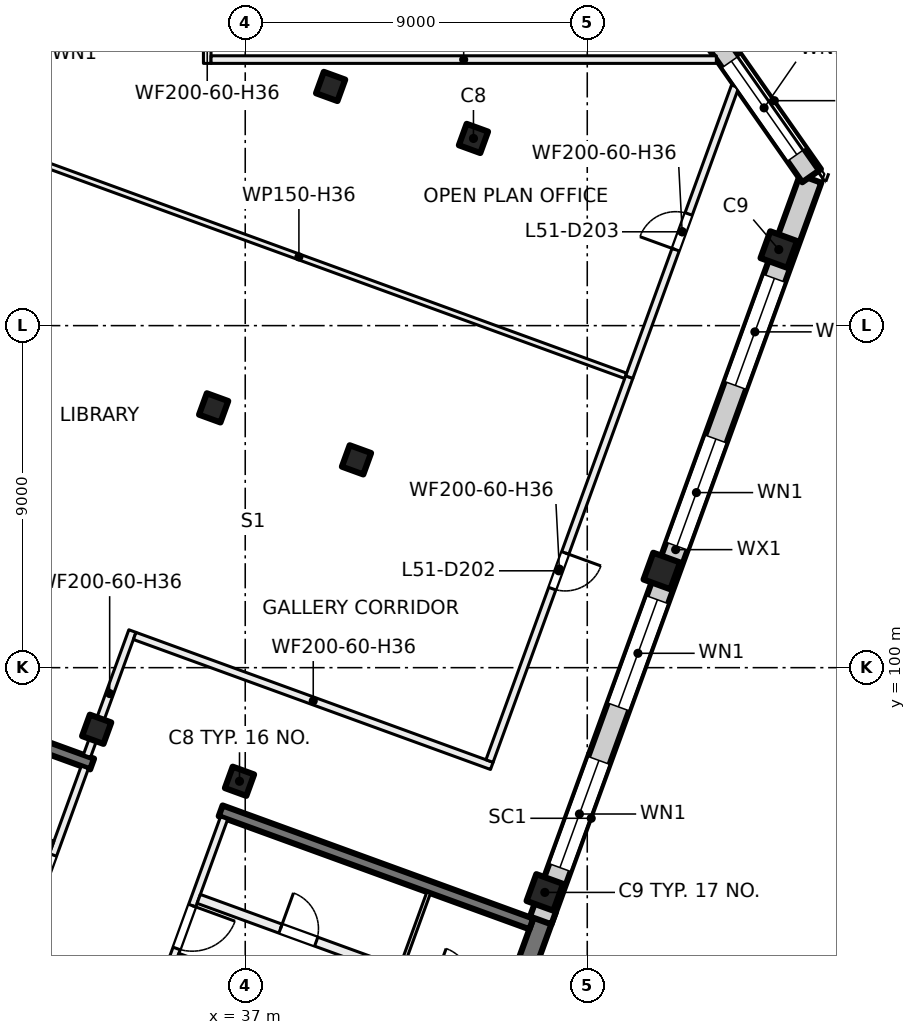
"""IFC4 building model, lengths in metres.
Left out: names, types, materials, properties, quantities, classifications, styles, units other than length and angle.
Written with IfcOpenShell. Run it as: python <this file> out.ifc"""

import sys

from ifc_helpers import new_model, si_unit, direction, frame, frame_2d, origin, origin_2d, place, context, subcontext, project, spatial, rectangle, extrude, element, fill, save


model = new_model("IFC4")
c1 = context("Model", 3, precision=1e-05, world=origin(), true_north=direction((0.0, 1.0)))
c2 = subcontext(c1, "Body", "Model", "MODEL_VIEW")
j1 = project(units=[si_unit("LENGTHUNIT", "METRE"), si_unit("PLANEANGLEUNIT", "RADIAN")], contexts=[c1])
p1 = place(None, origin())
s1 = spatial("IfcSite", under=j1, at=p1, CompositionType="ELEMENT")
p2 = place(p1, origin())
s2 = spatial("IfcBuilding", under=s1, at=p2, CompositionType="ELEMENT")
p3 = place(p2, frame((0.0, 0.0, 216.0)))
s3 = spatial("IfcBuildingStorey", under=s2, at=p3, CompositionType="ELEMENT", Elevation=216.0)
for number, where, z_axis, x_axis in (
    (1, (43.006, 113.925, 0.0), (0.0, 0.0, 1.0), (-0.342, -0.94, 0.0)),
    (2, (39.927, 105.468, 0.0), (0.0, 0.0, 1.0), (-0.342, -0.94, 0.0)),
    (3, (36.849, 97.011, 0.0), (0.0, 0.0, 1.0), (-0.342, -0.94, 0.0)),
    (4, (39.247, 115.293, 0.0), (0.0, 0.0, 1.0), (-0.342, -0.94, 0.0)),
    (5, (36.169, 106.836, 0.0), (0.0, 0.0, 1.0), (-0.342, -0.94, 0.0)),
    (6, (33.091, 98.379, 0.0), (0.0, 0.0, 1.0), (-0.342, -0.94, 0.0)),
):
    element("IfcColumn", number, at=place(p3, frame(where, z_axis=z_axis, x_axis=x_axis)), inside=s3, PredefinedType="COLUMN", context=c2, shape_type="SweptSolid", body=[
        extrude(rectangle(XDim=0.6, YDim=0.6, at=origin_2d()), origin(), (0.0, 0.0, 1.0), 4.0),
    ])
for number, where, z_axis, x_axis in (
    (7, (51.04, 111.001, 0.0), (0.0, 0.0, 1.0), (-0.342, -0.94, 0.0)),
    (8, (47.962, 102.544, 0.0), (0.0, 0.0, 1.0), (-0.342, -0.94, 0.0)),
    (9, (44.884, 94.087, 0.0), (0.0, 0.0, 1.0), (-0.342, -0.94, 0.0)),
):
    element("IfcColumn", number, at=place(p3, frame(where, z_axis=z_axis, x_axis=x_axis)), inside=s3, PredefinedType="COLUMN", context=c2, shape_type="SweptSolid", body=[
        extrude(rectangle(XDim=0.75, YDim=0.75, at=origin_2d()), origin(), (0.0, 0.0, 1.0), 4.0),
    ])
p4 = place(p3, frame((41.874, 85.232, 0.0), z_axis=(0.0, 0.0, 1.0), x_axis=(0.342020437038, 0.939692513883, 0.0)))
e10 = element("IfcWall", 10, at=p4, inside=s3, PredefinedType="SHEAR", context=c2, shape_type="SweptSolid", body=[
    extrude(rectangle(XDim=8.975, YDim=0.5, at=frame_2d((4.487, 0.0))), origin(), (0.0, 0.0, 1.0), 4.0),
])
p5 = place(p3, frame((44.529, 93.258, 0.0), z_axis=(0.0, 0.0, 1.0), x_axis=(-0.9396917844, 0.342022441267, 0.0)))
e11 = element("IfcWall", 11, at=p5, inside=s3, PredefinedType="SHEAR", context=c2, shape_type="SweptSolid", body=[
    extrude(rectangle(XDim=8.7, YDim=0.3, at=frame_2d((4.35, 0.0))), origin(), (0.0, 0.0, 1.0), 4.0),
])
p6 = place(p3, frame((32.971, 97.465, 0.0), z_axis=(0.0, 0.0, 1.0), x_axis=(-0.939695066972, 0.34201342241, 0.0)))
e12 = element("IfcWall", 12, at=p6, inside=s3, PredefinedType="SHEAR", context=c2, shape_type="SweptSolid", body=[
    extrude(rectangle(XDim=8.7, YDim=0.3, at=frame_2d((4.35, 0.0))), origin(), (0.0, 0.0, 1.0), 4.0),
])
p7 = place(p3, frame((51.877, 112.862, 0.0), z_axis=(0.0, 0.0, 1.0), x_axis=(-0.342020589714, -0.939692458314, 0.0)))
e13 = element("IfcWall", 13, at=p7, inside=s3, PredefinedType="SOLIDWALL", context=c2, shape_type="SweptSolid", body=[
    extrude(rectangle(XDim=20.765, YDim=0.6, at=frame_2d((10.382, 0.0))), origin(), (0.0, 0.0, 1.0), 3.625),
])
p8 = place(p7, frame((2.785, 0.0, 0.9)))
e14 = element("IfcOpeningElement", 14, at=p8, cuts=e13, PredefinedType="OPENING", context=c2, shape_type="SweptSolid", body=[
    extrude(rectangle(XDim=3.0, YDim=2.4, at=frame_2d((1.5, 1.2))), frame((0.0, 0.31, 0.0), z_axis=(0.0, -1.0, 0.0), x_axis=(1.0, 0.0, 0.0)), (0.0, 0.0, 1.0), 0.62),
])
p9 = place(p7, frame((7.285, 0.0, 0.9)))
e15 = element("IfcOpeningElement", 15, at=p9, cuts=e13, PredefinedType="OPENING", context=c2, shape_type="SweptSolid", body=[
    extrude(rectangle(XDim=3.0, YDim=2.4, at=frame_2d((1.5, 1.2))), frame((0.0, 0.31, 0.0), z_axis=(0.0, -1.0, 0.0), x_axis=(1.0, 0.0, 0.0)), (0.0, 0.0, 1.0), 0.62),
])
p10 = place(p7, frame((11.785, 0.0, 0.9)))
e16 = element("IfcOpeningElement", 16, at=p10, cuts=e13, PredefinedType="OPENING", context=c2, shape_type="SweptSolid", body=[
    extrude(rectangle(XDim=3.0, YDim=2.4, at=frame_2d((1.5, 1.2))), frame((0.0, 0.31, 0.0), z_axis=(0.0, -1.0, 0.0), x_axis=(1.0, 0.0, 0.0)), (0.0, 0.0, 1.0), 0.62),
])
p11 = place(p7, frame((16.285, 0.0, 0.9)))
e17 = element("IfcOpeningElement", 17, at=p11, cuts=e13, PredefinedType="OPENING", context=c2, shape_type="SweptSolid", body=[
    extrude(rectangle(XDim=3.0, YDim=2.4, at=frame_2d((1.5, 1.2))), frame((0.0, 0.31, 0.0), z_axis=(0.0, -1.0, 0.0), x_axis=(1.0, 0.0, 0.0)), (0.0, 0.0, 1.0), 0.62),
])
p12 = place(p3, frame((36.923, 134.338, 0.0), z_axis=(0.0, 0.0, 1.0), x_axis=(0.573575266068, -0.819152863729, 0.0)))
e18 = element("IfcWall", 18, at=p12, inside=s3, PredefinedType="SOLIDWALL", context=c2, shape_type="SweptSolid", body=[
    extrude(rectangle(XDim=26.117, YDim=0.6, at=frame_2d((13.059, 0.0))), origin(), (0.0, 0.0, 1.0), 3.625),
])
p13 = place(p12, frame((0.84, 0.0, 0.9)))
e19 = element("IfcOpeningElement", 19, at=p13, cuts=e18, PredefinedType="OPENING", context=c2, shape_type="SweptSolid", body=[
    extrude(rectangle(XDim=3.0, YDim=2.4, at=frame_2d((1.5, 1.2))), frame((0.0, 0.31, 0.0), z_axis=(0.0, -1.0, 0.0), x_axis=(1.0, 0.0, 0.0)), (0.0, 0.0, 1.0), 0.62),
])
p14 = place(p12, frame((5.069, 0.0, 0.9)))
e20 = element("IfcOpeningElement", 20, at=p14, cuts=e18, PredefinedType="OPENING", context=c2, shape_type="SweptSolid", body=[
    extrude(rectangle(XDim=3.0, YDim=2.4, at=frame_2d((1.5, 1.2))), frame((0.0, 0.31, 0.0), z_axis=(0.0, -1.0, 0.0), x_axis=(1.0, 0.0, 0.0)), (0.0, 0.0, 1.0), 0.62),
])
p15 = place(p12, frame((9.449, 0.0, 0.9)))
e21 = element("IfcOpeningElement", 21, at=p15, cuts=e18, PredefinedType="OPENING", context=c2, shape_type="SweptSolid", body=[
    extrude(rectangle(XDim=3.0, YDim=2.4, at=frame_2d((1.5, 1.2))), frame((0.0, 0.31, 0.0), z_axis=(0.0, -1.0, 0.0), x_axis=(1.0, 0.0, 0.0)), (0.0, 0.0, 1.0), 0.62),
])
p16 = place(p12, frame((13.829, 0.0, 0.9)))
e22 = element("IfcOpeningElement", 22, at=p16, cuts=e18, PredefinedType="OPENING", context=c2, shape_type="SweptSolid", body=[
    extrude(rectangle(XDim=3.0, YDim=2.4, at=frame_2d((1.5, 1.2))), frame((0.0, 0.31, 0.0), z_axis=(0.0, -1.0, 0.0), x_axis=(1.0, 0.0, 0.0)), (0.0, 0.0, 1.0), 0.62),
])
p17 = place(p12, frame((18.208, 0.0, 0.9)))
e23 = element("IfcOpeningElement", 23, at=p17, cuts=e18, PredefinedType="OPENING", context=c2, shape_type="SweptSolid", body=[
    extrude(rectangle(XDim=3.0, YDim=2.4, at=frame_2d((1.5, 1.2))), frame((0.0, 0.31, 0.0), z_axis=(0.0, -1.0, 0.0), x_axis=(1.0, 0.0, 0.0)), (0.0, 0.0, 1.0), 0.62),
])
p18 = place(p12, frame((22.438, 0.0, 0.9)))
e24 = element("IfcOpeningElement", 24, at=p18, cuts=e18, PredefinedType="OPENING", context=c2, shape_type="SweptSolid", body=[
    extrude(rectangle(XDim=3.0, YDim=2.4, at=frame_2d((1.5, 1.2))), frame((0.0, 0.31, 0.0), z_axis=(0.0, -1.0, 0.0), x_axis=(1.0, 0.0, 0.0)), (0.0, 0.0, 1.0), 0.62),
])
p19 = place(p3, frame((24.666, 100.669, 0.0), z_axis=(0.0, 0.0, 1.0), x_axis=(0.34201964167, 0.939692803373, 0.0)))
e25 = element("IfcWall", 25, at=p19, inside=s3, PredefinedType="SOLIDWALL", context=c2, shape_type="SweptSolid", body=[
    extrude(rectangle(XDim=32.884, YDim=0.6, at=frame_2d((16.442, 0.0))), origin(), (0.0, 0.0, 1.0), 3.625),
])
p20 = place(p19, frame((1.48, 0.0, 0.9)))
e26 = element("IfcOpeningElement", 26, at=p20, cuts=e25, PredefinedType="OPENING", context=c2, shape_type="SweptSolid", body=[
    extrude(rectangle(XDim=3.0, YDim=2.4, at=frame_2d((1.5, 1.2))), frame((0.0, 0.31, 0.0), z_axis=(0.0, -1.0, 0.0), x_axis=(1.0, 0.0, 0.0)), (0.0, 0.0, 1.0), 0.62),
])
p21 = place(p19, frame((5.98, 0.0, 0.9)))
e27 = element("IfcOpeningElement", 27, at=p21, cuts=e25, PredefinedType="OPENING", context=c2, shape_type="SweptSolid", body=[
    extrude(rectangle(XDim=3.0, YDim=2.4, at=frame_2d((1.5, 1.2))), frame((0.0, 0.31, 0.0), z_axis=(0.0, -1.0, 0.0), x_axis=(1.0, 0.0, 0.0)), (0.0, 0.0, 1.0), 0.62),
])
p22 = place(p19, frame((10.48, 0.0, 0.9)))
e28 = element("IfcOpeningElement", 28, at=p22, cuts=e25, PredefinedType="OPENING", context=c2, shape_type="SweptSolid", body=[
    extrude(rectangle(XDim=3.0, YDim=2.4, at=frame_2d((1.5, 1.2))), frame((0.0, 0.31, 0.0), z_axis=(0.0, -1.0, 0.0), x_axis=(1.0, 0.0, 0.0)), (0.0, 0.0, 1.0), 0.62),
])
p23 = place(p19, frame((14.98, 0.0, 0.9)))
e29 = element("IfcOpeningElement", 29, at=p23, cuts=e25, PredefinedType="OPENING", context=c2, shape_type="SweptSolid", body=[
    extrude(rectangle(XDim=3.0, YDim=2.4, at=frame_2d((1.5, 1.2))), frame((0.0, 0.31, 0.0), z_axis=(0.0, -1.0, 0.0), x_axis=(1.0, 0.0, 0.0)), (0.0, 0.0, 1.0), 0.62),
])
p24 = place(p19, frame((19.48, 0.0, 0.9)))
e30 = element("IfcOpeningElement", 30, at=p24, cuts=e25, PredefinedType="OPENING", context=c2, shape_type="SweptSolid", body=[
    extrude(rectangle(XDim=3.0, YDim=2.4, at=frame_2d((1.5, 1.2))), frame((0.0, 0.31, 0.0), z_axis=(0.0, -1.0, 0.0), x_axis=(1.0, 0.0, 0.0)), (0.0, 0.0, 1.0), 0.62),
])
p25 = place(p19, frame((23.98, 0.0, 0.9)))
e31 = element("IfcOpeningElement", 31, at=p25, cuts=e25, PredefinedType="OPENING", context=c2, shape_type="SweptSolid", body=[
    extrude(rectangle(XDim=3.0, YDim=2.4, at=frame_2d((1.5, 1.2))), frame((0.0, 0.31, 0.0), z_axis=(0.0, -1.0, 0.0), x_axis=(1.0, 0.0, 0.0)), (0.0, 0.0, 1.0), 0.62),
])
p26 = place(p19, frame((28.48, 0.0, 0.9)))
e32 = element("IfcOpeningElement", 32, at=p26, cuts=e25, PredefinedType="OPENING", context=c2, shape_type="SweptSolid", body=[
    extrude(rectangle(XDim=3.0, YDim=2.4, at=frame_2d((1.5, 1.2))), frame((0.0, 0.31, 0.0), z_axis=(0.0, -1.0, 0.0), x_axis=(1.0, 0.0, 0.0)), (0.0, 0.0, 1.0), 0.62),
])
p27 = place(p3, frame((31.427, 93.663, 0.0), z_axis=(0.0, 0.0, 1.0), x_axis=(0.342030870568, 0.93968871632, 0.0)))
e33 = element("IfcWall", 33, at=p27, inside=s3, PredefinedType="PARTITIONING", context=c2, shape_type="SweptSolid", body=[
    extrude(rectangle(XDim=3.95, YDim=0.2, at=frame_2d((1.975, 0.0))), origin(), (0.0, 0.0, 1.0), 3.625),
])
p28 = place(p27, frame((0.3, 0.0, 0.0)))
e34 = element("IfcOpeningElement", 34, at=p28, cuts=e33, PredefinedType="OPENING", context=c2, shape_type="SweptSolid", body=[
    extrude(rectangle(XDim=1.2, YDim=2.1, at=frame_2d((0.6, 1.05))), frame((0.0, 0.11, 0.0), z_axis=(0.0, -1.0, 0.0), x_axis=(1.0, 0.0, 0.0)), (0.0, 0.0, 1.0), 0.22),
])
p29 = place(p3, frame((23.983, 98.208, 0.0), z_axis=(0.0, 0.0, 1.0), x_axis=(0.939699751196, -0.342000552051, 0.0)))
e35 = element("IfcWall", 35, at=p29, inside=s3, PredefinedType="PARTITIONING", context=c2, shape_type="SweptSolid", body=[
    extrude(rectangle(XDim=8.45, YDim=0.25, at=frame_2d((4.225, 0.0))), origin(), (0.0, 0.0, 1.0), 3.625),
])
p30 = place(p29, frame((5.96, 0.0, 0.0)))
e36 = element("IfcOpeningElement", 36, at=p30, cuts=e35, PredefinedType="OPENING", context=c2, shape_type="SweptSolid", body=[
    extrude(rectangle(XDim=0.8, YDim=2.1, at=frame_2d((0.4, 1.05))), frame((0.0, 0.135, 0.0), z_axis=(0.0, -1.0, 0.0), x_axis=(1.0, 0.0, 0.0)), (0.0, 0.0, 1.0), 0.27),
])
p31 = place(p29, frame((1.685, 0.0, 0.0)))
e37 = element("IfcOpeningElement", 37, at=p31, cuts=e35, PredefinedType="OPENING", context=c2, shape_type="SweptSolid", body=[
    extrude(rectangle(XDim=0.8, YDim=2.1, at=frame_2d((0.4, 1.05))), frame((0.0, 0.135, 0.0), z_axis=(0.0, -1.0, 0.0), x_axis=(1.0, 0.0, 0.0)), (0.0, 0.0, 1.0), 0.27),
])
p32 = place(p3, frame((36.443, 96.041, 0.0), z_axis=(0.0, 0.0, 1.0), x_axis=(-0.341996156931, -0.939701350773, 0.0)))
e38 = element("IfcWall", 38, at=p32, inside=s3, PredefinedType="PARTITIONING", context=c2, shape_type="SweptSolid", body=[
    extrude(rectangle(XDim=3.95, YDim=0.2, at=frame_2d((1.975, 0.0))), origin(), (0.0, 0.0, 1.0), 3.625),
])
p33 = place(p32, frame((2.45, 0.0, 0.0)))
e39 = element("IfcOpeningElement", 39, at=p33, cuts=e38, PredefinedType="OPENING", context=c2, shape_type="SweptSolid", body=[
    extrude(rectangle(XDim=1.2, YDim=2.1, at=frame_2d((0.6, 1.05))), frame((0.0, 0.11, 0.0), z_axis=(0.0, -1.0, 0.0), x_axis=(1.0, 0.0, 0.0)), (0.0, 0.0, 1.0), 0.22),
])
p34 = place(p3, frame((35.22, 92.389, 0.0), z_axis=(0.0, 0.0, 1.0), x_axis=(0.939690465531, -0.342026064782, 0.0)))
e40 = element("IfcWall", 40, at=p34, inside=s3, PredefinedType="PARTITIONING", context=c2, shape_type="SweptSolid", body=[
    extrude(rectangle(XDim=8.45, YDim=0.2, at=frame_2d((4.225, 0.0))), origin(), (0.0, 0.0, 1.0), 3.625),
])
p35 = place(p34, frame((5.225, 0.0, 0.0)))
e41 = element("IfcOpeningElement", 41, at=p35, cuts=e40, PredefinedType="OPENING", context=c2, shape_type="SweptSolid", body=[
    extrude(rectangle(XDim=1.5, YDim=2.1, at=frame_2d((0.75, 1.05))), frame((0.0, 0.11, 0.0), z_axis=(0.0, -1.0, 0.0), x_axis=(1.0, 0.0, 0.0)), (0.0, 0.0, 1.0), 0.22),
])
p36 = place(p3, frame((35.776, 93.916, 0.0), z_axis=(0.0, 0.0, 1.0), x_axis=(0.939690465531, -0.342026064782, 0.0)))
e42 = element("IfcWall", 42, at=p36, inside=s3, PredefinedType="PARTITIONING", context=c2, shape_type="SweptSolid", body=[
    extrude(rectangle(XDim=8.45, YDim=0.25, at=frame_2d((4.225, 0.0))), origin(), (0.0, 0.0, 1.0), 3.625),
])
p37 = place(p36, frame((2.29, 0.0, 0.0)))
e43 = element("IfcOpeningElement", 43, at=p37, cuts=e42, PredefinedType="OPENING", context=c2, shape_type="SweptSolid", body=[
    extrude(rectangle(XDim=1.0, YDim=2.1, at=frame_2d((0.5, 1.05))), frame((0.0, 0.135, 0.0), z_axis=(0.0, -1.0, 0.0), x_axis=(1.0, 0.0, 0.0)), (0.0, 0.0, 1.0), 0.27),
])
p38 = place(p36, frame((6.565, 0.0, 0.0)))
e44 = element("IfcOpeningElement", 44, at=p38, cuts=e42, PredefinedType="OPENING", context=c2, shape_type="SweptSolid", body=[
    extrude(rectangle(XDim=1.0, YDim=2.1, at=frame_2d((0.5, 1.05))), frame((0.0, 0.135, 0.0), z_axis=(0.0, -1.0, 0.0), x_axis=(1.0, 0.0, 0.0)), (0.0, 0.0, 1.0), 0.27),
])
p39 = place(p3, frame((41.828, 94.082, 0.0), z_axis=(0.0, 0.0, 1.0), x_axis=(-0.342023078919, -0.939691552312, 0.0)))
e45 = element("IfcWall", 45, at=p39, inside=s3, PredefinedType="PARTITIONING", context=c2, shape_type="SweptSolid", body=[
    extrude(rectangle(XDim=2.1, YDim=0.1, at=frame_2d((1.05, 0.0))), origin(), (0.0, 0.0, 1.0), 3.625),
])
p40 = place(p3, frame((29.814, 113.938, 0.0), z_axis=(0.0, 0.0, 1.0), x_axis=(0.939695619185, -0.342011905181, 0.0)))
e46 = element("IfcWall", 46, at=p40, inside=s3, PredefinedType="PARTITIONING", context=c2, shape_type="SweptSolid", body=[
    extrude(rectangle(XDim=18.301, YDim=0.15, at=frame_2d((9.15, 0.0))), origin(), (0.0, 0.0, 1.0), 3.625),
])
p41 = place(p3, frame((32.834, 97.674, 0.0), z_axis=(0.0, 0.0, 1.0), x_axis=(0.342017493073, 0.939693585395, 0.0)))
e47 = element("IfcWall", 47, at=p41, inside=s3, PredefinedType="PARTITIONING", context=c2, shape_type="SweptSolid", body=[
    extrude(rectangle(XDim=3.5, YDim=0.2, at=frame_2d((1.75, 0.0))), origin(), (0.0, 0.0, 1.0), 3.625),
])
p42 = place(p3, frame((34.091, 100.835, 0.0), z_axis=(0.0, 0.0, 1.0), x_axis=(0.939702148643, -0.341993964619, 0.0)))
e48 = element("IfcWall", 48, at=p42, inside=s3, PredefinedType="PARTITIONING", context=c2, shape_type="SweptSolid", body=[
    extrude(rectangle(XDim=10.0, YDim=0.2, at=frame_2d((5.0, 0.0))), origin(), (0.0, 0.0, 1.0), 3.625),
])
p43 = place(p3, frame((36.0, 115.9, 0.0), z_axis=(0.0, 0.0, 1.0), x_axis=(0.0, 1.0, 0.0)))
e49 = element("IfcWall", 49, at=p43, inside=s3, PredefinedType="PARTITIONING", context=c2, shape_type="SweptSolid", body=[
    extrude(rectangle(XDim=4.2, YDim=0.2, at=frame_2d((2.1, 0.0))), origin(), (0.0, 0.0, 1.0), 3.625),
])
p44 = place(p3, frame((36.1, 116.0, 0.0), z_axis=(0.0, 0.0, 1.0), x_axis=(1.0, 0.0, 0.0)))
e50 = element("IfcWall", 50, at=p44, inside=s3, PredefinedType="PARTITIONING", context=c2, shape_type="SweptSolid", body=[
    extrude(rectangle(XDim=13.297, YDim=0.2, at=frame_2d((6.648, 0.0))), origin(), (0.0, 0.0, 1.0), 3.625),
])
p45 = place(p3, frame((43.428, 97.543, 0.0), z_axis=(0.0, 0.0, 1.0), x_axis=(0.342032970316, 0.939687952044, 0.0)))
e51 = element("IfcWall", 51, at=p45, inside=s3, PredefinedType="PARTITIONING", context=c2, shape_type="SweptSolid", body=[
    extrude(rectangle(XDim=10.75, YDim=0.2, at=frame_2d((5.375, 0.0))), origin(), (0.0, 0.0, 1.0), 3.625),
])
p46 = place(p45, frame((4.827, 0.0, 0.0)))
e52 = element("IfcOpeningElement", 52, at=p46, cuts=e51, PredefinedType="OPENING", context=c2, shape_type="SweptSolid", body=[
    extrude(rectangle(XDim=1.0, YDim=2.1, at=frame_2d((0.5, 1.05))), frame((0.0, 0.11, 0.0), z_axis=(0.0, -1.0, 0.0), x_axis=(1.0, 0.0, 0.0)), (0.0, 0.0, 1.0), 0.22),
])
p47 = place(p3, frame((47.105, 107.645, 0.0), z_axis=(0.0, 0.0, 1.0), x_axis=(0.342043994394, 0.939683939364, 0.0)))
e53 = element("IfcWall", 53, at=p47, inside=s3, PredefinedType="PARTITIONING", context=c2, shape_type="SweptSolid", body=[
    extrude(rectangle(XDim=8.142, YDim=0.2, at=frame_2d((4.071, 0.0))), origin(), (0.0, 0.0, 1.0), 3.625),
])
p48 = place(p47, frame((3.569, 0.0, 0.0)))
e54 = element("IfcOpeningElement", 54, at=p48, cuts=e53, PredefinedType="OPENING", context=c2, shape_type="SweptSolid", body=[
    extrude(rectangle(XDim=1.0, YDim=2.1, at=frame_2d((0.5, 1.05))), frame((0.0, 0.11, 0.0), z_axis=(0.0, -1.0, 0.0), x_axis=(1.0, 0.0, 0.0)), (0.0, 0.0, 1.0), 0.22),
])
p49 = place(p8, origin())
e55 = element("IfcWindow", 55, at=p49, inside=s3, PartitioningType="SINGLE_PANEL", PredefinedType="WINDOW", context=c2, shape_type="SweptSolid", body=[
    extrude(rectangle(XDim=3.0, YDim=2.4, at=frame_2d((1.5, 1.2))), frame((0.0, 0.03, 0.0), z_axis=(0.0, -1.0, 0.0), x_axis=(1.0, 0.0, 0.0)), (0.0, 0.0, 1.0), 0.06),
])
fill(e14, e55)
p50 = place(p9, origin())
e56 = element("IfcWindow", 56, at=p50, inside=s3, PartitioningType="SINGLE_PANEL", PredefinedType="WINDOW", context=c2, shape_type="SweptSolid", body=[
    extrude(rectangle(XDim=3.0, YDim=2.4, at=frame_2d((1.5, 1.2))), frame((0.0, 0.03, 0.0), z_axis=(0.0, -1.0, 0.0), x_axis=(1.0, 0.0, 0.0)), (0.0, 0.0, 1.0), 0.06),
])
fill(e15, e56)
p51 = place(p10, origin())
e57 = element("IfcWindow", 57, at=p51, inside=s3, PartitioningType="SINGLE_PANEL", PredefinedType="WINDOW", context=c2, shape_type="SweptSolid", body=[
    extrude(rectangle(XDim=3.0, YDim=2.4, at=frame_2d((1.5, 1.2))), frame((0.0, 0.03, 0.0), z_axis=(0.0, -1.0, 0.0), x_axis=(1.0, 0.0, 0.0)), (0.0, 0.0, 1.0), 0.06),
])
fill(e16, e57)
p52 = place(p11, origin())
e58 = element("IfcWindow", 58, at=p52, inside=s3, PartitioningType="SINGLE_PANEL", PredefinedType="WINDOW", context=c2, shape_type="SweptSolid", body=[
    extrude(rectangle(XDim=3.0, YDim=2.4, at=frame_2d((1.5, 1.2))), frame((0.0, 0.03, 0.0), z_axis=(0.0, -1.0, 0.0), x_axis=(1.0, 0.0, 0.0)), (0.0, 0.0, 1.0), 0.06),
])
fill(e17, e58)
p53 = place(p18, origin())
e59 = element("IfcWindow", 59, at=p53, inside=s3, PartitioningType="SINGLE_PANEL", PredefinedType="WINDOW", context=c2, shape_type="SweptSolid", body=[
    extrude(rectangle(XDim=3.0, YDim=2.4, at=frame_2d((1.5, 1.2))), frame((0.0, 0.03, 0.0), z_axis=(0.0, -1.0, 0.0), x_axis=(1.0, 0.0, 0.0)), (0.0, 0.0, 1.0), 0.06),
])
fill(e24, e59)
p54 = place(p28, origin())
e60 = element("IfcDoor", 60, at=p54, inside=s3, OperationType="DOUBLE_DOOR_SINGLE_SWING", PredefinedType="DOOR", context=c2, shape_type="SweptSolid", body=[
    extrude(rectangle(XDim=1.2, YDim=2.1, at=frame_2d((0.6, 1.05))), frame((0.0, 0.025, 0.0), z_axis=(0.0, -1.0, 0.0), x_axis=(1.0, 0.0, 0.0)), (0.0, 0.0, 1.0), 0.05),
])
fill(e34, e60)
p55 = place(p33, origin())
e61 = element("IfcDoor", 61, at=p55, inside=s3, OperationType="DOUBLE_DOOR_SINGLE_SWING", PredefinedType="DOOR", context=c2, shape_type="SweptSolid", body=[
    extrude(rectangle(XDim=1.2, YDim=2.1, at=frame_2d((0.6, 1.05))), frame((0.0, 0.025, 0.0), z_axis=(0.0, -1.0, 0.0), x_axis=(1.0, 0.0, 0.0)), (0.0, 0.0, 1.0), 0.05),
])
fill(e39, e61)
p56 = place(p37, origin())
e62 = element("IfcDoor", 62, at=p56, inside=s3, OperationType="SINGLE_SWING_RIGHT", PredefinedType="DOOR", context=c2, shape_type="SweptSolid", body=[
    extrude(rectangle(XDim=1.0, YDim=2.1, at=frame_2d((0.5, 1.05))), frame((0.0, 0.025, 0.0), z_axis=(0.0, -1.0, 0.0), x_axis=(1.0, 0.0, 0.0)), (0.0, 0.0, 1.0), 0.05),
])
fill(e43, e62)
p57 = place(p46, origin())
e63 = element("IfcDoor", 63, at=p57, inside=s3, OperationType="SINGLE_SWING_RIGHT", PredefinedType="DOOR", context=c2, shape_type="SweptSolid", body=[
    extrude(rectangle(XDim=1.0, YDim=2.1, at=frame_2d((0.5, 1.05))), frame((0.0, 0.025, 0.0), z_axis=(0.0, -1.0, 0.0), x_axis=(1.0, 0.0, 0.0)), (0.0, 0.0, 1.0), 0.05),
])
fill(e52, e63)
p58 = place(p48, origin())
e64 = element("IfcDoor", 64, at=p58, inside=s3, OperationType="SINGLE_SWING_LEFT", PredefinedType="DOOR", context=c2, shape_type="SweptSolid", body=[
    extrude(rectangle(XDim=1.0, YDim=2.1, at=frame_2d((0.5, 1.05))), frame((0.0, 0.025, 0.0), z_axis=(0.0, -1.0, 0.0), x_axis=(1.0, 0.0, 0.0)), (0.0, 0.0, 1.0), 0.05),
])
fill(e54, e64)
save(model, sys.argv[1])
